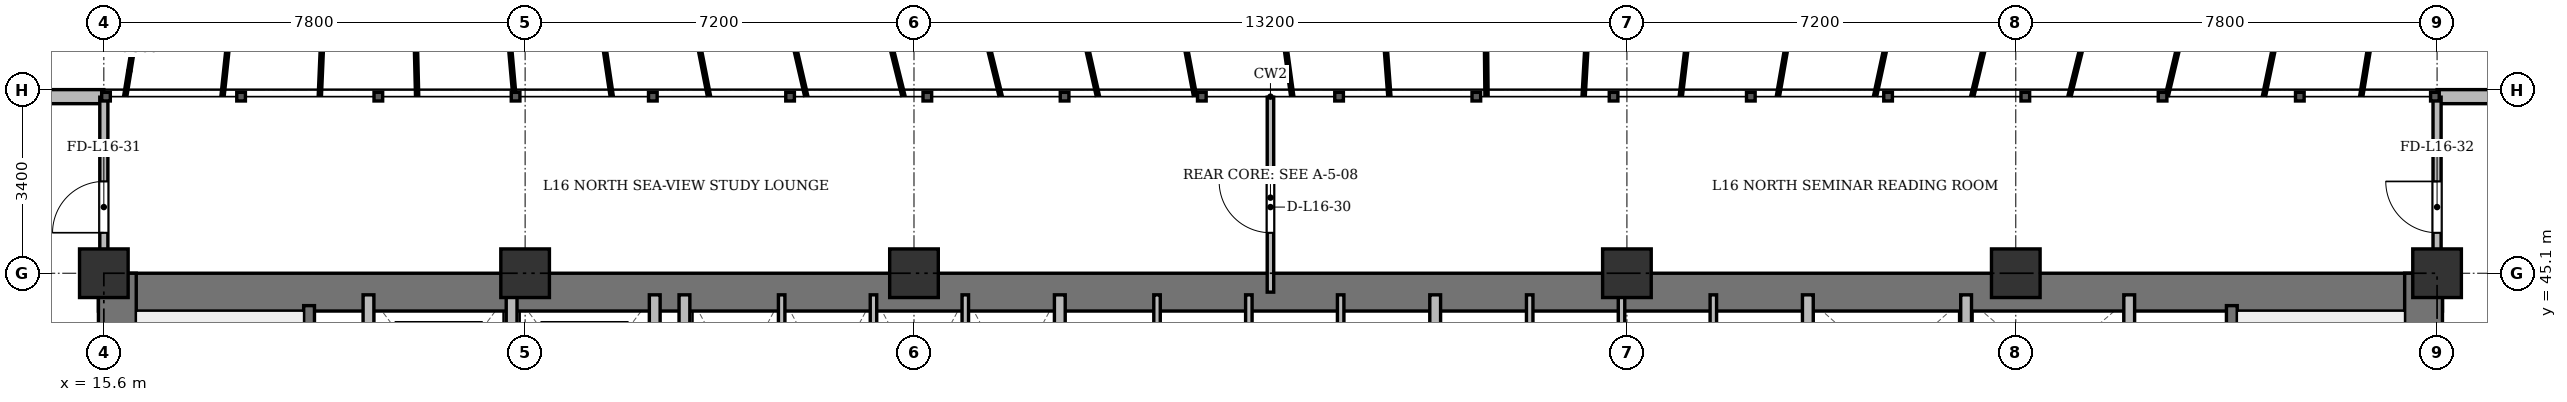
"""IFC4 building model, lengths in metres.
Left out: names, types, materials, properties, quantities, classifications, styles, units other than length and angle.
Written with IfcOpenShell. Run it as: python <this file> out.ifc"""

import sys

from ifc_helpers import new_model, si_unit, direction, frame, frame_2d, origin, origin_2d, place, context, subcontext, project, spatial, rectangle, extrude, source, transform, mapped, element, fill, save


model = new_model("IFC4")
c1 = context("Model", 3, precision=1e-05, world=origin(), true_north=direction((0.0, 1.0)))
c2 = subcontext(c1, "Body", "Model", "MODEL_VIEW")
j1 = project(units=[si_unit("LENGTHUNIT", "METRE"), si_unit("PLANEANGLEUNIT", "RADIAN")], contexts=[c1])
p1 = place(None, origin())
s1 = spatial("IfcSite", under=j1, at=p1, CompositionType="ELEMENT")
p2 = place(p1, origin())
s2 = spatial("IfcBuilding", under=s1, at=p2, CompositionType="ELEMENT")
p3 = place(p2, frame((0.0, 0.0, 63.1)))
s3 = spatial("IfcBuildingStorey", under=s2, at=p3, CompositionType="ELEMENT", Elevation=63.1)
m1 = source(origin(), c2, "Body", "SweptSolid", [
    extrude(rectangle(XDim=0.9, YDim=0.9, at=origin_2d()), origin(), (0.0, 0.0, 1.0), 3.6),
])
for number, where, z_axis, x_axis in (
    (1, (15.6, 45.1, 0.0), (0.0, 0.0, 1.0), (1.0, 0.0, 0.0)),
    (2, (23.4, 45.1, 0.0), (0.0, 0.0, 1.0), (1.0, 0.0, 0.0)),
    (3, (30.6, 45.1, 0.0), (0.0, 0.0, 1.0), (1.0, 0.0, 0.0)),
    (4, (43.8, 45.1, 0.0), (0.0, 0.0, 1.0), (1.0, 0.0, 0.0)),
    (5, (51.0, 45.1, 0.0), (0.0, 0.0, 1.0), (1.0, 0.0, 0.0)),
    (6, (58.8, 45.1, 0.0), (0.0, 0.0, 1.0), (1.0, 0.0, 0.0)),
):
    element("IfcColumn", number, at=place(p3, frame(where, z_axis=z_axis, x_axis=x_axis)), inside=s3, PredefinedType="COLUMN", context=c2, shape_type="MappedRepresentation", body=[
        mapped(m1, transform((0.0, 0.0, 0.0), x_axis=(1.0, 0.0, 0.0), y_axis=(0.0, 1.0, 0.0), z_axis=(0.0, 0.0, 1.0), scale=1.0)),
    ])
p4 = place(p3, frame((7.6, 48.37, 0.0), z_axis=(0.0, 0.0, 1.0), x_axis=(1.0, 0.0, 0.0)))
e7 = element("IfcWall", 7, at=p4, inside=s3, PredefinedType="SOLIDWALL", context=c2, shape_type="SweptSolid", body=[
    extrude(rectangle(XDim=8.0, YDim=0.26, at=frame_2d((4.0, 0.0))), origin(), (0.0, 0.0, 1.0), 3.34),
])
p5 = place(p4, frame((0.768, 0.0, 0.9)))
e8 = element("IfcOpeningElement", 8, at=p5, cuts=e7, PredefinedType="OPENING", context=c2, shape_type="SweptSolid", body=[
    extrude(rectangle(XDim=1.2, YDim=1.65, at=frame_2d((0.6, 0.825))), frame((0.0, 0.14, 0.0), z_axis=(0.0, -1.0, 0.0), x_axis=(1.0, 0.0, 0.0)), (0.0, 0.0, 1.0), 0.28),
])
p6 = place(p4, frame((4.608, 0.0, 0.9)))
e9 = element("IfcOpeningElement", 9, at=p6, cuts=e7, PredefinedType="OPENING", context=c2, shape_type="SweptSolid", body=[
    extrude(rectangle(XDim=1.2, YDim=1.65, at=frame_2d((0.6, 0.825))), frame((0.0, 0.14, 0.0), z_axis=(0.0, -1.0, 0.0), x_axis=(1.0, 0.0, 0.0)), (0.0, 0.0, 1.0), 0.28),
])
p7 = place(p3, frame((58.8, 48.37, 0.0), z_axis=(0.0, 0.0, 1.0), x_axis=(1.0, 0.0, 0.0)))
e10 = element("IfcWall", 10, at=p7, inside=s3, PredefinedType="SOLIDWALL", context=c2, shape_type="SweptSolid", body=[
    extrude(rectangle(XDim=8.0, YDim=0.26, at=frame_2d((4.0, 0.0))), origin(), (0.0, 0.0, 1.0), 3.34),
])
p8 = place(p7, frame((3.308, 0.0, 0.9)))
e11 = element("IfcOpeningElement", 11, at=p8, cuts=e10, PredefinedType="OPENING", context=c2, shape_type="SweptSolid", body=[
    extrude(rectangle(XDim=1.2, YDim=1.65, at=frame_2d((0.6, 0.825))), frame((0.0, 0.14, 0.0), z_axis=(0.0, -1.0, 0.0), x_axis=(1.0, 0.0, 0.0)), (0.0, 0.0, 1.0), 0.28),
])
p9 = place(p3, frame((15.5, 44.75, 0.0), z_axis=(0.0, 0.0, 1.0), x_axis=(1.0, 0.0, 0.0)))
e12 = element("IfcWall", 12, at=p9, inside=s3, PredefinedType="SHEAR", context=c2, shape_type="SweptSolid", body=[
    extrude(rectangle(XDim=43.4, YDim=0.7, at=frame_2d((21.7, 0.0))), origin(), (0.0, 0.0, 1.0), 3.34),
])
for number, where, z_axis, x_axis in (
    (13, (15.85, 33.4, 0.0), (0.0, 0.0, 1.0), (0.0, 1.0, 0.0)),
    (14, (58.55, 33.4, 0.0), (0.0, 0.0, 1.0), (0.0, 1.0, 0.0)),
):
    element("IfcWall", number, at=place(p3, frame(where, z_axis=z_axis, x_axis=x_axis)), inside=s3, PredefinedType="SHEAR", context=c2, shape_type="SweptSolid", body=[
        extrude(rectangle(XDim=11.7, YDim=0.7, at=frame_2d((5.85, 0.0))), origin(), (0.0, 0.0, 1.0), 3.34),
    ])
p10 = place(p3, frame((19.4, 33.4, 0.0), z_axis=(0.0, 0.0, 1.0), x_axis=(0.0, 1.0, 0.0)))
e15 = element("IfcWall", 15, at=p10, inside=s3, PredefinedType="SHEAR", context=c2, shape_type="SweptSolid", body=[
    extrude(rectangle(XDim=11.1, YDim=0.2, at=frame_2d((5.55, 0.0))), origin(), (0.0, 0.0, 1.0), 3.34),
])
p11 = place(p10, frame((0.85, 0.0, 0.0)))
e16 = element("IfcOpeningElement", 16, at=p11, cuts=e15, PredefinedType="OPENING", context=c2, shape_type="SweptSolid", body=[
    extrude(rectangle(XDim=1.1, YDim=2.15, at=frame_2d((0.55, 1.075))), frame((0.0, 0.11, 0.0), z_axis=(0.0, -1.0, 0.0), x_axis=(1.0, 0.0, 0.0)), (0.0, 0.0, 1.0), 0.22),
])
p12 = place(p3, frame((55.0, 33.4, 0.0), z_axis=(0.0, 0.0, 1.0), x_axis=(0.0, 1.0, 0.0)))
e17 = element("IfcWall", 17, at=p12, inside=s3, PredefinedType="SHEAR", context=c2, shape_type="SweptSolid", body=[
    extrude(rectangle(XDim=11.1, YDim=0.2, at=frame_2d((5.55, 0.0))), origin(), (0.0, 0.0, 1.0), 3.34),
])
p13 = place(p12, frame((0.85, 0.0, 0.0)))
e18 = element("IfcOpeningElement", 18, at=p13, cuts=e17, PredefinedType="OPENING", context=c2, shape_type="SweptSolid", body=[
    extrude(rectangle(XDim=1.1, YDim=2.15, at=frame_2d((0.55, 1.075))), frame((0.0, 0.11, 0.0), z_axis=(0.0, -1.0, 0.0), x_axis=(1.0, 0.0, 0.0)), (0.0, 0.0, 1.0), 0.22),
])
for number, where, z_axis, x_axis in (
    (19, (20.5, 41.3, 0.0), (0.0, 0.0, 1.0), (0.0, 1.0, 0.0)),
    (20, (23.15, 41.3, 0.0), (0.0, 0.0, 1.0), (0.0, 1.0, 0.0)),
    (21, (25.8, 41.3, 0.0), (0.0, 0.0, 1.0), (0.0, 1.0, 0.0)),
):
    element("IfcWall", number, at=place(p3, frame(where, z_axis=z_axis, x_axis=x_axis)), inside=s3, PredefinedType="SOLIDWALL", context=c2, shape_type="SweptSolid", body=[
        extrude(rectangle(XDim=3.4, YDim=0.2, at=frame_2d((1.7, 0.0))), origin(), (0.0, 0.0, 1.0), 3.34),
    ])
p14 = place(p3, frame((26.35, 33.4, 0.0), z_axis=(0.0, 0.0, 1.0), x_axis=(0.0, 1.0, 0.0)))
e22 = element("IfcWall", 22, at=p14, inside=s3, PredefinedType="SOLIDWALL", context=c2, shape_type="SweptSolid", body=[
    extrude(rectangle(XDim=11.3, YDim=0.2, at=frame_2d((5.65, 0.0))), origin(), (0.0, 0.0, 1.0), 2.69),
])
p15 = place(p3, frame((33.3, 41.5, 0.0), z_axis=(0.0, 0.0, 1.0), x_axis=(0.0, 1.0, 0.0)))
e23 = element("IfcWall", 23, at=p15, inside=s3, PredefinedType="SOLIDWALL", context=c2, shape_type="SweptSolid", body=[
    extrude(rectangle(XDim=3.2, YDim=0.2, at=frame_2d((1.6, 0.0))), origin(), (0.0, 0.0, 1.0), 3.34),
])
for number, where, z_axis, x_axis in (
    (24, (28.15, 41.5, 0.0), (0.0, 0.0, 1.0), (0.0, 1.0, 0.0)),
    (25, (29.85, 41.5, 0.0), (0.0, 0.0, 1.0), (0.0, 1.0, 0.0)),
    (26, (31.55, 41.5, 0.0), (0.0, 0.0, 1.0), (0.0, 1.0, 0.0)),
    (27, (35.1, 41.5, 0.0), (0.0, 0.0, 1.0), (0.0, 1.0, 0.0)),
    (28, (36.8, 41.5, 0.0), (0.0, 0.0, 1.0), (0.0, 1.0, 0.0)),
    (29, (38.5, 41.5, 0.0), (0.0, 0.0, 1.0), (0.0, 1.0, 0.0)),
):
    element("IfcWall", number, at=place(p3, frame(where, z_axis=z_axis, x_axis=x_axis)), inside=s3, PredefinedType="PARTITIONING", context=c2, shape_type="SweptSolid", body=[
        extrude(rectangle(XDim=3.2, YDim=0.12, at=frame_2d((1.6, 0.0))), origin(), (0.0, 0.0, 1.0), 3.34),
    ])
p16 = place(p3, frame((40.25, 41.5, 0.0), z_axis=(0.0, 0.0, 1.0), x_axis=(0.0, 1.0, 0.0)))
e30 = element("IfcWall", 30, at=p16, inside=s3, PredefinedType="SOLIDWALL", context=c2, shape_type="SweptSolid", body=[
    extrude(rectangle(XDim=3.2, YDim=0.2, at=frame_2d((1.6, 0.0))), origin(), (0.0, 0.0, 1.0), 3.34),
])
p17 = place(p3, frame((42.0, 41.5, 0.0), z_axis=(0.0, 0.0, 1.0), x_axis=(0.0, 1.0, 0.0)))
e31 = element("IfcWall", 31, at=p17, inside=s3, PredefinedType="PARTITIONING", context=c2, shape_type="SweptSolid", body=[
    extrude(rectangle(XDim=3.2, YDim=0.12, at=frame_2d((1.6, 0.0))), origin(), (0.0, 0.0, 1.0), 3.34),
])
p18 = place(p3, frame((43.7, 41.5, 0.0), z_axis=(0.0, 0.0, 1.0), x_axis=(0.0, 1.0, 0.0)))
e32 = element("IfcWall", 32, at=p18, inside=s3, PredefinedType="PARTITIONING", context=c2, shape_type="SweptSolid", body=[
    extrude(rectangle(XDim=3.2, YDim=0.12, at=frame_2d((1.6, 0.0))), origin(), (0.0, 0.0, 1.0), 2.752),
])
p19 = place(p3, frame((45.4, 41.5, 0.0), z_axis=(0.0, 0.0, 1.0), x_axis=(0.0, 1.0, 0.0)))
e33 = element("IfcWall", 33, at=p19, inside=s3, PredefinedType="PARTITIONING", context=c2, shape_type="SweptSolid", body=[
    extrude(rectangle(XDim=3.2, YDim=0.12, at=frame_2d((1.6, 0.0))), origin(), (0.0, 0.0, 1.0), 3.34),
])
p20 = place(p3, frame((47.15, 33.4, 0.0), z_axis=(0.0, 0.0, 1.0), x_axis=(0.0, 1.0, 0.0)))
e34 = element("IfcWall", 34, at=p20, inside=s3, PredefinedType="SOLIDWALL", context=c2, shape_type="SweptSolid", body=[
    extrude(rectangle(XDim=11.3, YDim=0.2, at=frame_2d((5.65, 0.0))), origin(), (0.0, 0.0, 1.0), 2.69),
])
for number, where, z_axis, x_axis in (
    (35, (50.08, 42.05, 0.0), (0.0, 0.0, 1.0), (0.0, 1.0, 0.0)),
    (36, (53.1, 42.05, 0.0), (0.0, 0.0, 1.0), (0.0, 1.0, 0.0)),
):
    element("IfcWall", number, at=place(p3, frame(where, z_axis=z_axis, x_axis=x_axis)), inside=s3, PredefinedType="SOLIDWALL", context=c2, shape_type="SweptSolid", body=[
        extrude(rectangle(XDim=2.65, YDim=0.2, at=frame_2d((1.325, 0.0))), origin(), (0.0, 0.0, 1.0), 3.34),
    ])
p21 = place(p3, frame((37.2, 44.75, 0.0), z_axis=(0.0, 0.0, 1.0), x_axis=(0.0, 1.0, 0.0)))
e37 = element("IfcWall", 37, at=p21, inside=s3, PredefinedType="PARTITIONING", context=c2, shape_type="SweptSolid", body=[
    extrude(rectangle(XDim=3.61, YDim=0.12, at=frame_2d((1.805, 0.0))), origin(), (0.0, 0.0, 1.0), 2.69),
])
p22 = place(p21, frame((1.1, 0.0, 0.0)))
e38 = element("IfcOpeningElement", 38, at=p22, cuts=e37, PredefinedType="OPENING", context=c2, shape_type="SweptSolid", body=[
    extrude(rectangle(XDim=0.95, YDim=2.15, at=frame_2d((0.475, 1.075))), frame((0.0, 0.07, 0.0), z_axis=(0.0, -1.0, 0.0), x_axis=(1.0, 0.0, 0.0)), (0.0, 0.0, 1.0), 0.14),
])
p23 = place(p3, frame((15.6, 44.75, 0.0), z_axis=(0.0, 0.0, 1.0), x_axis=(0.0, 1.0, 0.0)))
e39 = element("IfcWall", 39, at=p23, inside=s3, PredefinedType="PARTITIONING", context=c2, shape_type="SweptSolid", body=[
    extrude(rectangle(XDim=3.61, YDim=0.15, at=frame_2d((1.805, 0.0))), origin(), (0.0, 0.0, 1.0), 2.752),
])
p24 = place(p23, frame((1.1, 0.0, 0.0)))
e40 = element("IfcOpeningElement", 40, at=p24, cuts=e39, PredefinedType="OPENING", context=c2, shape_type="SweptSolid", body=[
    extrude(rectangle(XDim=0.95, YDim=2.15, at=frame_2d((0.475, 1.075))), frame((0.0, 0.085, 0.0), z_axis=(0.0, -1.0, 0.0), x_axis=(1.0, 0.0, 0.0)), (0.0, 0.0, 1.0), 0.17),
])
p25 = place(p3, frame((58.8, 44.75, 0.0), z_axis=(0.0, 0.0, 1.0), x_axis=(0.0, 1.0, 0.0)))
e41 = element("IfcWall", 41, at=p25, inside=s3, PredefinedType="PARTITIONING", context=c2, shape_type="SweptSolid", body=[
    extrude(rectangle(XDim=3.61, YDim=0.15, at=frame_2d((1.805, 0.0))), origin(), (0.0, 0.0, 1.0), 2.752),
])
p26 = place(p25, frame((1.1, 0.0, 0.0)))
e42 = element("IfcOpeningElement", 42, at=p26, cuts=e41, PredefinedType="OPENING", context=c2, shape_type="SweptSolid", body=[
    extrude(rectangle(XDim=0.95, YDim=2.15, at=frame_2d((0.475, 1.075))), frame((0.0, 0.085, 0.0), z_axis=(0.0, -1.0, 0.0), x_axis=(1.0, 0.0, 0.0)), (0.0, 0.0, 1.0), 0.17),
])
m2 = source(origin(), c2, "Body", "SweptSolid", [
    extrude(rectangle(XDim=0.95, YDim=2.15, at=frame_2d((0.475, 1.075))), frame((0.0, 0.025, 0.0), z_axis=(0.0, -1.0, 0.0), x_axis=(1.0, 0.0, 0.0)), (0.0, 0.0, 1.0), 0.05),
])
p27 = place(p22, origin())
e43 = element("IfcDoor", 43, at=p27, inside=s3, OperationType="SINGLE_SWING_RIGHT", PredefinedType="DOOR", context=c2, shape_type="MappedRepresentation", body=[
    mapped(m2, transform((0.0, 0.0, 0.0), x_axis=(1.0, 0.0, 0.0), y_axis=(0.0, 1.0, 0.0), z_axis=(0.0, 0.0, 1.0), scale=1.0)),
])
fill(e38, e43)
p28 = place(p24, origin())
e44 = element("IfcDoor", 44, at=p28, inside=s3, OperationType="SINGLE_SWING_LEFT", PredefinedType="DOOR", context=c2, shape_type="MappedRepresentation", body=[
    mapped(m2, transform((0.0, 0.0, 0.0), x_axis=(1.0, 0.0, 0.0), y_axis=(0.0, 1.0, 0.0), z_axis=(0.0, 0.0, 1.0), scale=1.0)),
])
fill(e40, e44)
p29 = place(p26, origin())
e45 = element("IfcDoor", 45, at=p29, inside=s3, OperationType="SINGLE_SWING_RIGHT", PredefinedType="DOOR", context=c2, shape_type="MappedRepresentation", body=[
    mapped(m2, transform((0.0, 0.0, 0.0), x_axis=(1.0, 0.0, 0.0), y_axis=(0.0, 1.0, 0.0), z_axis=(0.0, 0.0, 1.0), scale=1.0)),
])
fill(e42, e45)
save(model, sys.argv[1])
